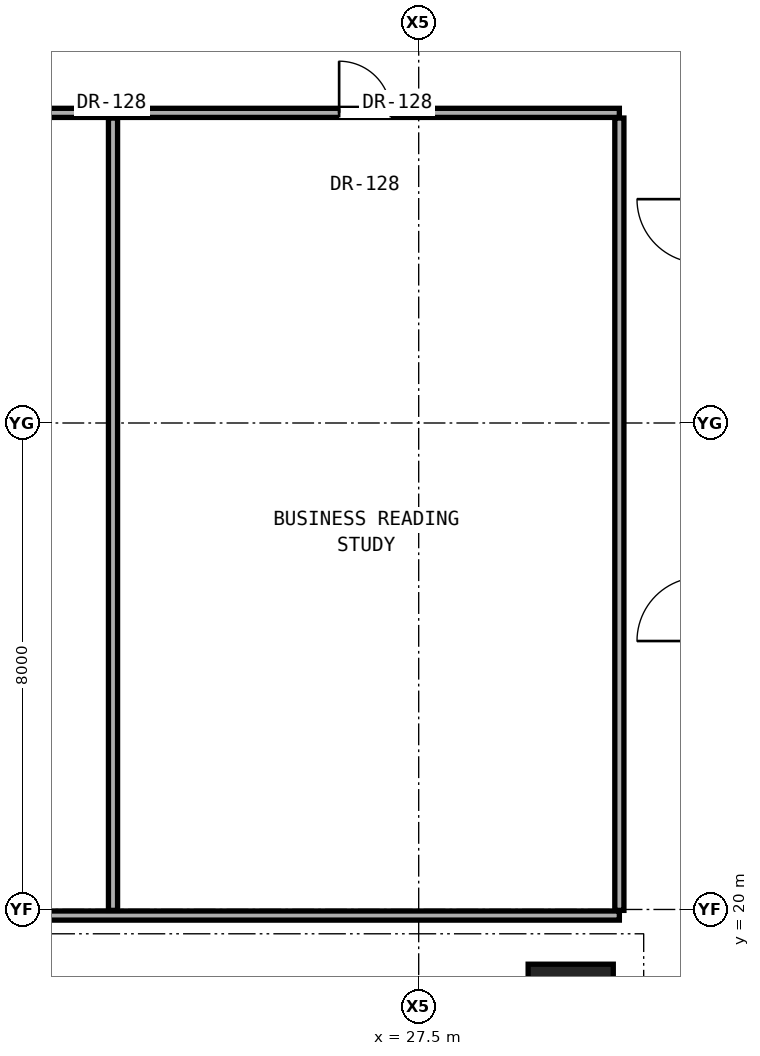
"""IFC4 building model, lengths in metres.
Left out: names, types, materials, properties, quantities, classifications, styles, units other than length and angle.
Written with IfcOpenShell. Run it as: python <this file> out.ifc"""

import sys

from ifc_helpers import new_model, si_unit, direction, frame, frame_2d, origin, origin_2d, place, context, subcontext, project, spatial, rectangle, extrude, element, fill, save


model = new_model("IFC4")
c1 = context("Model", 3, precision=1e-05, world=origin(), true_north=direction((0.0, 1.0)))
c2 = subcontext(c1, "Body", "Model", "MODEL_VIEW")
j1 = project(units=[si_unit("LENGTHUNIT", "METRE"), si_unit("PLANEANGLEUNIT", "RADIAN")], contexts=[c1])
p1 = place(None, origin())
s1 = spatial("IfcSite", under=j1, at=p1, CompositionType="ELEMENT")
p2 = place(p1, origin())
s2 = spatial("IfcBuilding", under=s1, at=p2, CompositionType="ELEMENT")
p3 = place(p2, frame((0.0, 0.0, 25.7)))
s3 = spatial("IfcBuildingStorey", under=s2, at=p3, CompositionType="ELEMENT", Elevation=25.7)
p4 = place(p3, frame((30.0, 18.4, 0.0), z_axis=(0.0, 0.0, 1.0), x_axis=(1.0, 0.0, 0.0)))
e1 = element("IfcColumn", 1, at=p4, inside=s3, PredefinedType="COLUMN", context=c2, shape_type="SweptSolid", body=[
    extrude(rectangle(XDim=1.4, YDim=1.4, at=origin_2d()), origin(), (0.0, 0.0, 1.0), 3.3),
])
p5 = place(p3, frame((10.2, 19.9, 0.0), z_axis=(0.0, 0.0, 1.0), x_axis=(1.0, 0.0, 0.0)))
e2 = element("IfcWall", 2, at=p5, inside=s3, PredefinedType="PARTITIONING", context=c2, shape_type="SweptSolid", body=[
    extrude(rectangle(XDim=20.6, YDim=0.15, at=frame_2d((10.3, 0.0))), origin(), (0.0, 0.0, 1.0), 2.104),
])
p6 = place(p5, frame((1.695, 0.0, 0.0)))
e3 = element("IfcOpeningElement", 3, at=p6, cuts=e2, PredefinedType="OPENING", context=c2, shape_type="SweptSolid", body=[
    extrude(rectangle(XDim=0.85, YDim=2.01, at=frame_2d((0.425, 1.005))), frame((0.0, 0.085, 0.0), z_axis=(0.0, -1.0, 0.0), x_axis=(1.0, 0.0, 0.0)), (0.0, 0.0, 1.0), 0.17),
])
p7 = place(p5, frame((3.94, 0.0, 0.0)))
e4 = element("IfcOpeningElement", 4, at=p7, cuts=e2, PredefinedType="OPENING", context=c2, shape_type="SweptSolid", body=[
    extrude(rectangle(XDim=0.85, YDim=2.01, at=frame_2d((0.425, 1.005))), frame((0.0, 0.085, 0.0), z_axis=(0.0, -1.0, 0.0), x_axis=(1.0, 0.0, 0.0)), (0.0, 0.0, 1.0), 0.17),
])
p8 = place(p5, frame((8.576, 0.0, 0.0)))
e5 = element("IfcOpeningElement", 5, at=p8, cuts=e2, PredefinedType="OPENING", context=c2, shape_type="SweptSolid", body=[
    extrude(rectangle(XDim=0.85, YDim=2.01, at=frame_2d((0.425, 1.005))), frame((0.0, 0.085, 0.0), z_axis=(0.0, -1.0, 0.0), x_axis=(1.0, 0.0, 0.0)), (0.0, 0.0, 1.0), 0.17),
])
p9 = place(p3, frame((10.2, 33.1, 0.0), z_axis=(0.0, 0.0, 1.0), x_axis=(1.0, 0.0, 0.0)))
e6 = element("IfcWall", 6, at=p9, inside=s3, PredefinedType="PARTITIONING", context=c2, shape_type="SweptSolid", body=[
    extrude(rectangle(XDim=20.6, YDim=0.15, at=frame_2d((10.3, 0.0))), origin(), (0.0, 0.0, 1.0), 2.104),
])
p10 = place(p9, frame((15.991, 0.0, 0.0)))
e7 = element("IfcOpeningElement", 7, at=p10, cuts=e6, PredefinedType="OPENING", context=c2, shape_type="SweptSolid", body=[
    extrude(rectangle(XDim=0.85, YDim=2.01, at=frame_2d((0.425, 1.005))), frame((0.0, 0.085, 0.0), z_axis=(0.0, -1.0, 0.0), x_axis=(1.0, 0.0, 0.0)), (0.0, 0.0, 1.0), 0.17),
])
p11 = place(p3, frame((22.473, 19.985, 0.0), z_axis=(0.0, 0.0, 1.0), x_axis=(0.0, 1.0, 0.0)))
e8 = element("IfcWall", 8, at=p11, inside=s3, PredefinedType="PARTITIONING", context=c2, shape_type="SweptSolid", body=[
    extrude(rectangle(XDim=13.03, YDim=0.15, at=frame_2d((6.515, 0.0))), origin(), (0.0, 0.0, 1.0), 2.104),
])
p12 = place(p3, frame((30.8, 19.985, 0.0), z_axis=(0.0, 0.0, 1.0), x_axis=(0.0, 1.0, 0.0)))
e9 = element("IfcWall", 9, at=p12, inside=s3, PredefinedType="PARTITIONING", context=c2, shape_type="SweptSolid", body=[
    extrude(rectangle(XDim=13.03, YDim=0.15, at=frame_2d((6.515, 0.0))), origin(), (0.0, 0.0, 1.0), 2.279),
])
p13 = place(p10, origin())
e10 = element("IfcDoor", 10, at=p13, inside=s3, OperationType="SINGLE_SWING_LEFT", PredefinedType="DOOR", context=c2, shape_type="SweptSolid", body=[
    extrude(rectangle(XDim=0.85, YDim=2.01, at=frame_2d((0.425, 1.005))), frame((0.0, 0.025, 0.0), z_axis=(0.0, -1.0, 0.0), x_axis=(1.0, 0.0, 0.0)), (0.0, 0.0, 1.0), 0.05),
])
fill(e7, e10)
save(model, sys.argv[1])
